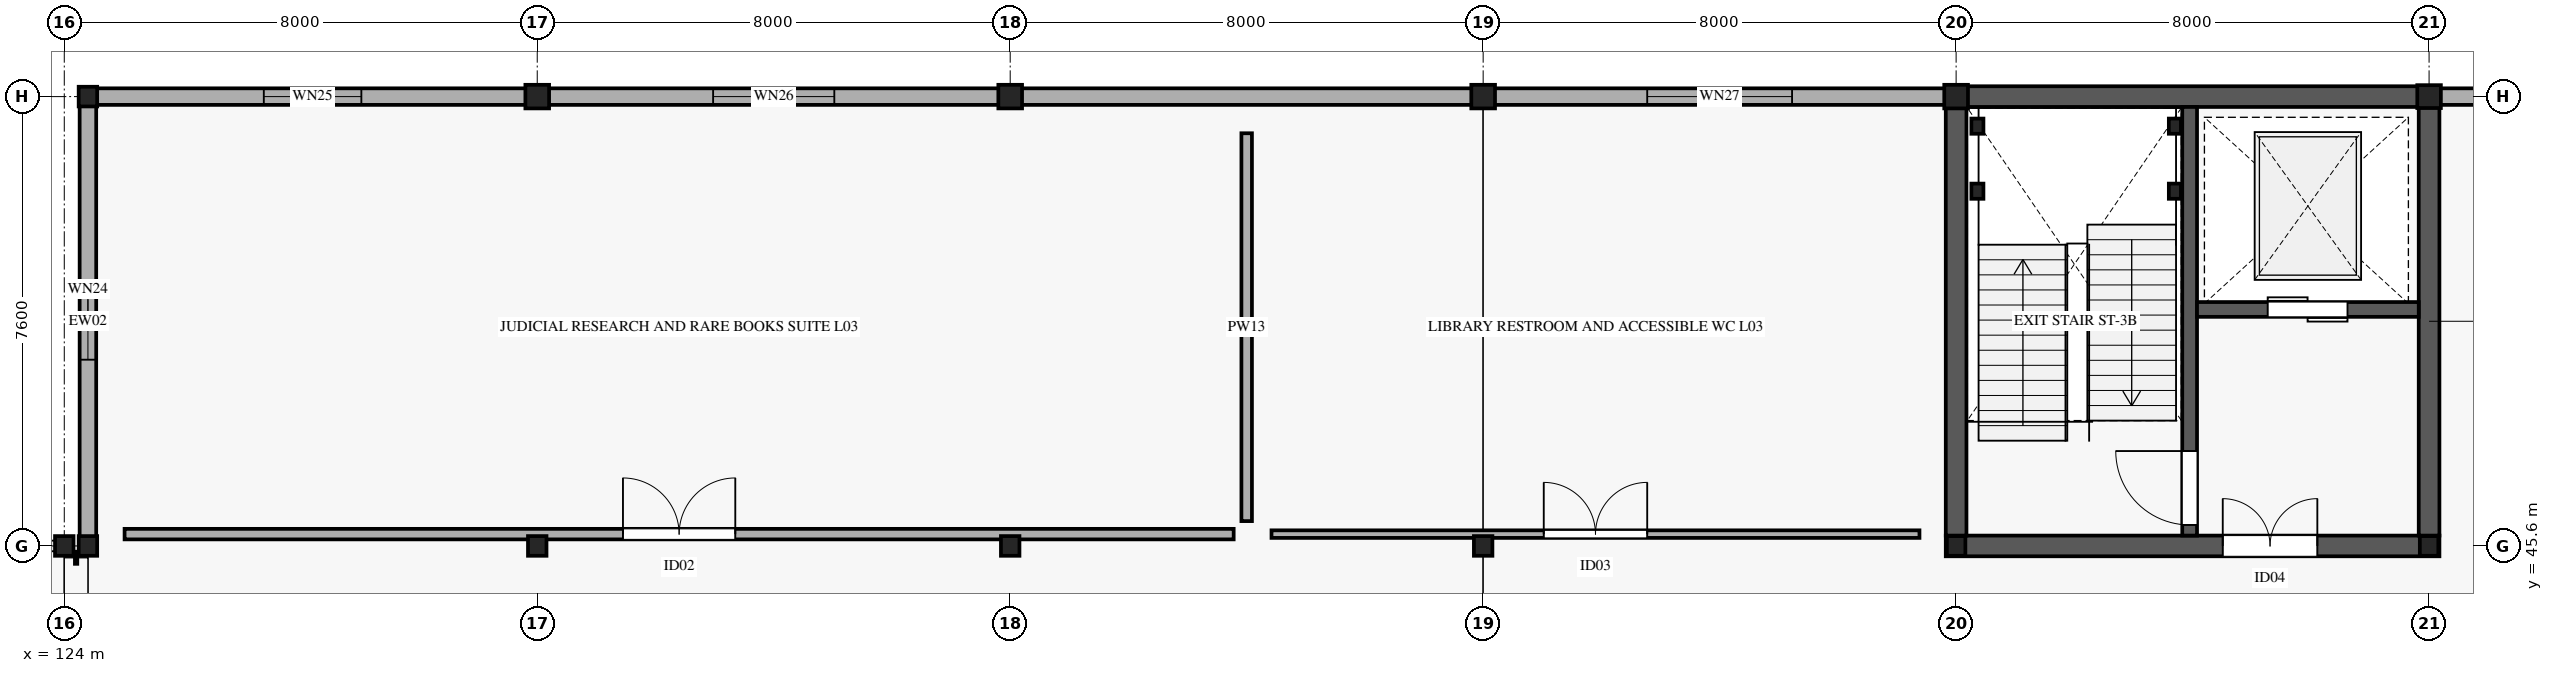
"""IFC4 building model, lengths in metres.
Left out: names, types, materials, properties, quantities, classifications, styles, units other than length and angle.
Written with IfcOpenShell. Run it as: python <this file> out.ifc"""

import sys

from ifc_helpers import new_model, si_unit, direction, frame, frame_2d, origin, origin_2d, place, context, subcontext, project, spatial, rectangle, i_section, extrude, element, fill, save


model = new_model("IFC4")
c1 = context("Model", 3, precision=1e-05, world=origin(), true_north=direction((0.0, 1.0)))
c2 = subcontext(c1, "Body", "Model", "MODEL_VIEW")
j1 = project(units=[si_unit("LENGTHUNIT", "METRE"), si_unit("PLANEANGLEUNIT", "RADIAN")], contexts=[c1])
p1 = place(None, origin())
s1 = spatial("IfcSite", under=j1, at=p1, CompositionType="ELEMENT")
p2 = place(p1, origin())
s2 = spatial("IfcBuilding", under=s1, at=p2, CompositionType="ELEMENT")
p3 = place(p2, frame((0.0, 0.0, 15.6)))
s3 = spatial("IfcBuildingStorey", under=s2, at=p3, CompositionType="ELEMENT", Elevation=15.6)
for number, where, z_axis, x_axis in (
    (1, (124.4, 45.6, 0.0), (0.0, 0.0, 1.0), (1.0, 0.0, 0.0)),
    (2, (124.4, 53.2, 0.0), (0.0, 0.0, 1.0), (1.0, 0.0, 0.0)),
    (3, (132.0, 45.6, 0.0), (0.0, 0.0, 1.0), (1.0, 0.0, 0.0)),
):
    element("IfcColumn", number, at=place(p3, frame(where, z_axis=z_axis, x_axis=x_axis)), inside=s3, PredefinedType="COLUMN", context=c2, shape_type="SweptSolid", body=[
        extrude(i_section(OverallWidth=0.313, OverallDepth=0.333, WebThickness=0.018, FlangeThickness=0.028, FilletRadius=0.015, at=origin_2d()), origin(), (0.0, 0.0, 1.0), 4.545),
    ])
p4 = place(p3, frame((132.0, 53.2, 0.0), z_axis=(0.0, 0.0, 1.0), x_axis=(1.0, 0.0, 0.0)))
e4 = element("IfcColumn", 4, at=p4, inside=s3, PredefinedType="COLUMN", context=c2, shape_type="SweptSolid", body=[
    extrude(i_section(OverallWidth=0.401, OverallDepth=0.399, WebThickness=0.025, FlangeThickness=0.04, FilletRadius=0.015, at=origin_2d()), origin(), (0.0, 0.0, 1.0), 4.545),
])
p5 = place(p3, frame((140.0, 45.6, 0.0), z_axis=(0.0, 0.0, 1.0), x_axis=(1.0, 0.0, 0.0)))
e5 = element("IfcColumn", 5, at=p5, inside=s3, PredefinedType="COLUMN", context=c2, shape_type="SweptSolid", body=[
    extrude(i_section(OverallWidth=0.313, OverallDepth=0.333, WebThickness=0.018, FlangeThickness=0.028, FilletRadius=0.015, at=origin_2d()), origin(), (0.0, 0.0, 1.0), 4.545),
])
p6 = place(p3, frame((140.0, 53.2, 0.0), z_axis=(0.0, 0.0, 1.0), x_axis=(1.0, 0.0, 0.0)))
e6 = element("IfcColumn", 6, at=p6, inside=s3, PredefinedType="COLUMN", context=c2, shape_type="SweptSolid", body=[
    extrude(i_section(OverallWidth=0.401, OverallDepth=0.399, WebThickness=0.025, FlangeThickness=0.04, FilletRadius=0.015, at=origin_2d()), origin(), (0.0, 0.0, 1.0), 4.545),
])
p7 = place(p3, frame((148.0, 45.6, 0.0), z_axis=(0.0, 0.0, 1.0), x_axis=(1.0, 0.0, 0.0)))
e7 = element("IfcColumn", 7, at=p7, inside=s3, PredefinedType="COLUMN", context=c2, shape_type="SweptSolid", body=[
    extrude(i_section(OverallWidth=0.313, OverallDepth=0.333, WebThickness=0.018, FlangeThickness=0.028, FilletRadius=0.015, at=origin_2d()), origin(), (0.0, 0.0, 1.0), 4.545),
])
p8 = place(p3, frame((148.0, 53.2, 0.0), z_axis=(0.0, 0.0, 1.0), x_axis=(1.0, 0.0, 0.0)))
e8 = element("IfcColumn", 8, at=p8, inside=s3, PredefinedType="COLUMN", context=c2, shape_type="SweptSolid", body=[
    extrude(i_section(OverallWidth=0.401, OverallDepth=0.399, WebThickness=0.025, FlangeThickness=0.04, FilletRadius=0.015, at=origin_2d()), origin(), (0.0, 0.0, 1.0), 4.545),
])
p9 = place(p3, frame((156.0, 45.6, 0.0), z_axis=(0.0, 0.0, 1.0), x_axis=(1.0, 0.0, 0.0)))
e9 = element("IfcColumn", 9, at=p9, inside=s3, PredefinedType="COLUMN", context=c2, shape_type="SweptSolid", body=[
    extrude(i_section(OverallWidth=0.313, OverallDepth=0.333, WebThickness=0.018, FlangeThickness=0.028, FilletRadius=0.015, at=origin_2d()), origin(), (0.0, 0.0, 1.0), 4.545),
])
p10 = place(p3, frame((156.0, 53.2, 0.0), z_axis=(0.0, 0.0, 1.0), x_axis=(1.0, 0.0, 0.0)))
e10 = element("IfcColumn", 10, at=p10, inside=s3, PredefinedType="COLUMN", context=c2, shape_type="SweptSolid", body=[
    extrude(i_section(OverallWidth=0.401, OverallDepth=0.399, WebThickness=0.025, FlangeThickness=0.04, FilletRadius=0.015, at=origin_2d()), origin(), (0.0, 0.0, 1.0), 4.545),
])
p11 = place(p3, frame((164.0, 45.6, 0.0), z_axis=(0.0, 0.0, 1.0), x_axis=(1.0, 0.0, 0.0)))
e11 = element("IfcColumn", 11, at=p11, inside=s3, PredefinedType="COLUMN", context=c2, shape_type="SweptSolid", body=[
    extrude(i_section(OverallWidth=0.313, OverallDepth=0.333, WebThickness=0.018, FlangeThickness=0.028, FilletRadius=0.015, at=origin_2d()), origin(), (0.0, 0.0, 1.0), 4.545),
])
p12 = place(p3, frame((164.0, 53.2, 0.0), z_axis=(0.0, 0.0, 1.0), x_axis=(1.0, 0.0, 0.0)))
e12 = element("IfcColumn", 12, at=p12, inside=s3, PredefinedType="COLUMN", context=c2, shape_type="SweptSolid", body=[
    extrude(i_section(OverallWidth=0.399, OverallDepth=0.387, WebThickness=0.021, FlangeThickness=0.033, FilletRadius=0.015, at=origin_2d()), origin(), (0.0, 0.0, 1.0), 4.545),
])
p13 = place(p3, frame((124.0, 45.6, 0.0), z_axis=(0.0, 0.0, 1.0), x_axis=(1.0, 0.0, 0.0)))
e13 = element("IfcColumn", 13, at=p13, inside=s3, PredefinedType="COLUMN", context=c2, shape_type="SweptSolid", body=[
    extrude(i_section(OverallWidth=0.313, OverallDepth=0.333, WebThickness=0.018, FlangeThickness=0.028, FilletRadius=0.015, at=origin_2d()), origin(), (0.0, 0.0, 1.0), 4.59),
])
p14 = place(p3, frame((124.4, 45.58, 0.0), z_axis=(0.0, 0.0, 1.0), x_axis=(0.0, 1.0, 0.0)))
e14 = element("IfcWall", 14, at=p14, inside=s3, PredefinedType="STANDARD", context=c2, shape_type="SweptSolid", body=[
    extrude(rectangle(XDim=7.64, YDim=0.28, at=frame_2d((3.82, 0.0))), origin(), (0.0, 0.0, 1.0), 3.605),
])
p15 = place(p14, frame((3.17, 0.0, 0.75)))
e15 = element("IfcOpeningElement", 15, at=p15, cuts=e14, PredefinedType="OPENING", context=c2, shape_type="SweptSolid", body=[
    extrude(rectangle(XDim=1.3, YDim=1.55, at=frame_2d((0.65, 0.775))), frame((0.0, 0.15, 0.0), z_axis=(0.0, -1.0, 0.0), x_axis=(1.0, 0.0, 0.0)), (0.0, 0.0, 1.0), 0.3),
])
p16 = place(p3, frame((124.38, 53.2, 0.0), z_axis=(0.0, 0.0, 1.0), x_axis=(1.0, 0.0, 0.0)))
e16 = element("IfcWall", 16, at=p16, inside=s3, PredefinedType="STANDARD", context=c2, shape_type="SweptSolid", body=[
    extrude(rectangle(XDim=7.64, YDim=0.28, at=frame_2d((3.82, 0.0))), origin(), (0.0, 0.0, 1.0), 3.605),
])
p17 = place(p16, frame((2.995, 0.0, 0.75)))
e17 = element("IfcOpeningElement", 17, at=p17, cuts=e16, PredefinedType="OPENING", context=c2, shape_type="SweptSolid", body=[
    extrude(rectangle(XDim=1.65, YDim=1.55, at=frame_2d((0.825, 0.775))), frame((0.0, 0.15, 0.0), z_axis=(0.0, -1.0, 0.0), x_axis=(1.0, 0.0, 0.0)), (0.0, 0.0, 1.0), 0.3),
])
p18 = place(p3, frame((131.98, 53.2, 0.0), z_axis=(0.0, 0.0, 1.0), x_axis=(1.0, 0.0, 0.0)))
e18 = element("IfcWall", 18, at=p18, inside=s3, PredefinedType="STANDARD", context=c2, shape_type="SweptSolid", body=[
    extrude(rectangle(XDim=8.04, YDim=0.28, at=frame_2d((4.02, 0.0))), origin(), (0.0, 0.0, 1.0), 3.605),
])
p19 = place(p18, frame((2.995, 0.0, 0.75)))
e19 = element("IfcOpeningElement", 19, at=p19, cuts=e18, PredefinedType="OPENING", context=c2, shape_type="SweptSolid", body=[
    extrude(rectangle(XDim=2.05, YDim=1.55, at=frame_2d((1.025, 0.775))), frame((0.0, 0.15, 0.0), z_axis=(0.0, -1.0, 0.0), x_axis=(1.0, 0.0, 0.0)), (0.0, 0.0, 1.0), 0.3),
])
p20 = place(p3, frame((139.98, 53.2, 0.0), z_axis=(0.0, 0.0, 1.0), x_axis=(1.0, 0.0, 0.0)))
e20 = element("IfcWall", 20, at=p20, inside=s3, PredefinedType="STANDARD", context=c2, shape_type="SweptSolid", body=[
    extrude(rectangle(XDim=8.04, YDim=0.28, at=frame_2d((4.02, 0.0))), origin(), (0.0, 0.0, 1.0), 3.605),
])
p21 = place(p3, frame((147.98, 53.2, 0.0), z_axis=(0.0, 0.0, 1.0), x_axis=(1.0, 0.0, 0.0)))
e21 = element("IfcWall", 21, at=p21, inside=s3, PredefinedType="STANDARD", context=c2, shape_type="SweptSolid", body=[
    extrude(rectangle(XDim=8.04, YDim=0.28, at=frame_2d((4.02, 0.0))), origin(), (0.0, 0.0, 1.0), 3.605),
])
p22 = place(p21, frame((2.795, 0.0, 0.75)))
e22 = element("IfcOpeningElement", 22, at=p22, cuts=e21, PredefinedType="OPENING", context=c2, shape_type="SweptSolid", body=[
    extrude(rectangle(XDim=2.45, YDim=1.55, at=frame_2d((1.225, 0.775))), frame((0.0, 0.15, 0.0), z_axis=(0.0, -1.0, 0.0), x_axis=(1.0, 0.0, 0.0)), (0.0, 0.0, 1.0), 0.3),
])
p23 = place(p3, frame((163.98, 53.2, 0.0), z_axis=(0.0, 0.0, 1.0), x_axis=(1.0, 0.0, 0.0)))
e23 = element("IfcWall", 23, at=p23, inside=s3, PredefinedType="STANDARD", context=c2, shape_type="SweptSolid", body=[
    extrude(rectangle(XDim=8.04, YDim=0.28, at=frame_2d((4.02, 0.0))), origin(), (0.0, 0.0, 1.0), 3.605),
])
p24 = place(p23, frame((2.595, 0.0, 0.75)))
e24 = element("IfcOpeningElement", 24, at=p24, cuts=e23, PredefinedType="OPENING", context=c2, shape_type="SweptSolid", body=[
    extrude(rectangle(XDim=2.85, YDim=1.55, at=frame_2d((1.425, 0.775))), frame((0.0, 0.15, 0.0), z_axis=(0.0, -1.0, 0.0), x_axis=(1.0, 0.0, 0.0)), (0.0, 0.0, 1.0), 0.3),
])
p25 = place(p3, frame((124.18, 45.4, 0.0), z_axis=(0.0, 0.0, 1.0), x_axis=(1.0, 0.0, 0.0)))
e25 = element("IfcWall", 25, at=p25, inside=s3, PredefinedType="STANDARD", context=c2, shape_type="SweptSolid", body=[
    extrude(rectangle(XDim=0.04, YDim=0.205, at=frame_2d((0.02, 0.0))), origin(), (0.0, 0.0, 1.0), 4.02),
])
p26 = place(p3, frame((155.825, 45.6, 0.0), z_axis=(0.0, 0.0, 1.0), x_axis=(1.0, 0.0, 0.0)))
e26 = element("IfcWall", 26, at=p26, inside=s3, PredefinedType="SHEAR", context=c2, shape_type="SweptSolid", body=[
    extrude(rectangle(XDim=8.35, YDim=0.35, at=frame_2d((4.175, 0.0))), origin(), (0.0, 0.0, 1.0), 4.545),
])
p27 = place(p26, frame((4.685, 0.0, 0.0)))
e27 = element("IfcOpeningElement", 27, at=p27, cuts=e26, PredefinedType="OPENING", context=c2, shape_type="SweptSolid", body=[
    extrude(rectangle(XDim=1.6, YDim=2.35, at=frame_2d((0.8, 1.175))), frame((0.0, 0.185, 0.0), z_axis=(0.0, -1.0, 0.0), x_axis=(1.0, 0.0, 0.0)), (0.0, 0.0, 1.0), 0.37),
])
p28 = place(p3, frame((155.825, 53.2, 0.0), z_axis=(0.0, 0.0, 1.0), x_axis=(1.0, 0.0, 0.0)))
e28 = element("IfcWall", 28, at=p28, inside=s3, PredefinedType="SHEAR", context=c2, shape_type="SweptSolid", body=[
    extrude(rectangle(XDim=8.35, YDim=0.35, at=frame_2d((4.175, 0.0))), origin(), (0.0, 0.0, 1.0), 4.545),
])
for number, where, z_axis, x_axis in (
    (29, (156.0, 45.775, 0.0), (0.0, 0.0, 1.0), (0.0, 1.0, 0.0)),
    (30, (164.0, 45.775, 0.0), (0.0, 0.0, 1.0), (0.0, 1.0, 0.0)),
):
    element("IfcWall", number, at=place(p3, frame(where, z_axis=z_axis, x_axis=x_axis)), inside=s3, PredefinedType="SHEAR", context=c2, shape_type="SweptSolid", body=[
        extrude(rectangle(XDim=7.25, YDim=0.35, at=frame_2d((3.625, 0.0))), origin(), (0.0, 0.0, 1.0), 4.545),
    ])
p29 = place(p3, frame((159.95, 45.775, 0.0), z_axis=(0.0, 0.0, 1.0), x_axis=(0.0, 1.0, 0.0)))
e31 = element("IfcWall", 31, at=p29, inside=s3, PredefinedType="SHEAR", context=c2, shape_type="SweptSolid", body=[
    extrude(rectangle(XDim=7.25, YDim=0.25, at=frame_2d((3.625, 0.0))), origin(), (0.0, 0.0, 1.0), 4.545),
])
p30 = place(p29, frame((0.18, 0.0, 0.0)))
e32 = element("IfcOpeningElement", 32, at=p30, cuts=e31, PredefinedType="OPENING", context=c2, shape_type="SweptSolid", body=[
    extrude(rectangle(XDim=1.25, YDim=2.2, at=frame_2d((0.625, 1.1))), frame((0.0, 0.135, 0.0), z_axis=(0.0, -1.0, 0.0), x_axis=(1.0, 0.0, 0.0)), (0.0, 0.0, 1.0), 0.27),
])
p31 = place(p3, frame((160.075, 49.6, 0.0), z_axis=(0.0, 0.0, 1.0), x_axis=(1.0, 0.0, 0.0)))
e33 = element("IfcWall", 33, at=p31, inside=s3, PredefinedType="SHEAR", context=c2, shape_type="SweptSolid", body=[
    extrude(rectangle(XDim=3.75, YDim=0.25, at=frame_2d((1.875, 0.0))), origin(), (0.0, 0.0, 1.0), 4.545),
])
p32 = place(p31, frame((1.195, 0.0, 0.0)))
e34 = element("IfcOpeningElement", 34, at=p32, cuts=e33, PredefinedType="OPENING", context=c2, shape_type="SweptSolid", body=[
    extrude(rectangle(XDim=1.35, YDim=2.2, at=frame_2d((0.675, 1.1))), frame((0.0, 0.135, 0.0), z_axis=(0.0, -1.0, 0.0), x_axis=(1.0, 0.0, 0.0)), (0.0, 0.0, 1.0), 0.27),
])
for number, where, z_axis, x_axis in (
    (35, (156.36, 51.6, 0.0), (0.0, 0.0, 1.0), (1.0, 0.0, 0.0)),
    (36, (159.7, 51.6, 0.0), (0.0, 0.0, 1.0), (1.0, 0.0, 0.0)),
    (37, (156.36, 52.7, 0.0), (0.0, 0.0, 1.0), (1.0, 0.0, 0.0)),
    (38, (159.7, 52.7, 0.0), (0.0, 0.0, 1.0), (1.0, 0.0, 0.0)),
):
    element("IfcColumn", number, at=place(p3, frame(where, z_axis=z_axis, x_axis=x_axis)), inside=s3, PredefinedType="COLUMN", context=c2, shape_type="SweptSolid", body=[
        extrude(i_section(OverallWidth=0.204, OverallDepth=0.257, WebThickness=0.009, FlangeThickness=0.016, FilletRadius=0.013, at=origin_2d()), origin(), (0.0, 0.0, 1.0), 4.795),
    ])
p33 = place(p3, frame((125.02, 45.8, 0.0), z_axis=(0.0, 0.0, 1.0), x_axis=(1.0, 0.0, 0.0)))
e39 = element("IfcWall", 39, at=p33, inside=s3, PredefinedType="PARTITIONING", context=c2, shape_type="SweptSolid", body=[
    extrude(rectangle(XDim=18.76, YDim=0.178, at=frame_2d((9.38, 0.0))), origin(), (0.0, 0.0, 1.0), 3.45),
])
p34 = place(p33, frame((8.43, 0.0, 0.0)))
e40 = element("IfcOpeningElement", 40, at=p34, cuts=e39, PredefinedType="OPENING", context=c2, shape_type="SweptSolid", body=[
    extrude(rectangle(XDim=1.9, YDim=2.4, at=frame_2d((0.95, 1.2))), frame((0.0, 0.099, 0.0), z_axis=(0.0, -1.0, 0.0), x_axis=(1.0, 0.0, 0.0)), (0.0, 0.0, 1.0), 0.198),
])
p35 = place(p3, frame((144.0, 46.02, 0.0), z_axis=(0.0, 0.0, 1.0), x_axis=(0.0, 1.0, 0.0)))
e41 = element("IfcWall", 41, at=p35, inside=s3, PredefinedType="PARTITIONING", context=c2, shape_type="SweptSolid", body=[
    extrude(rectangle(XDim=6.56, YDim=0.178, at=frame_2d((3.28, 0.0))), origin(), (0.0, 0.0, 1.0), 3.45),
])
p36 = place(p3, frame((144.42, 45.8, 0.0), z_axis=(0.0, 0.0, 1.0), x_axis=(1.0, 0.0, 0.0)))
e42 = element("IfcWall", 42, at=p36, inside=s3, PredefinedType="PARTITIONING", context=c2, shape_type="SweptSolid", body=[
    extrude(rectangle(XDim=10.96, YDim=0.128, at=frame_2d((5.48, 0.0))), origin(), (0.0, 0.0, 1.0), 3.45),
])
p37 = place(p36, frame((4.605, 0.0, 0.0)))
e43 = element("IfcOpeningElement", 43, at=p37, cuts=e42, PredefinedType="OPENING", context=c2, shape_type="SweptSolid", body=[
    extrude(rectangle(XDim=1.75, YDim=2.35, at=frame_2d((0.875, 1.175))), frame((0.0, 0.074, 0.0), z_axis=(0.0, -1.0, 0.0), x_axis=(1.0, 0.0, 0.0)), (0.0, 0.0, 1.0), 0.148),
])
p38 = place(p15, origin())
e44 = element("IfcWindow", 44, at=p38, inside=s3, PartitioningType="SINGLE_PANEL", PredefinedType="WINDOW", context=c2, shape_type="SweptSolid", body=[
    extrude(rectangle(XDim=1.3, YDim=1.55, at=frame_2d((0.65, 0.775))), frame((0.0, 0.03, 0.0), z_axis=(0.0, -1.0, 0.0), x_axis=(1.0, 0.0, 0.0)), (0.0, 0.0, 1.0), 0.06),
])
fill(e15, e44)
p39 = place(p17, origin())
e45 = element("IfcWindow", 45, at=p39, inside=s3, PartitioningType="SINGLE_PANEL", PredefinedType="WINDOW", context=c2, shape_type="SweptSolid", body=[
    extrude(rectangle(XDim=1.65, YDim=1.55, at=frame_2d((0.825, 0.775))), frame((0.0, 0.03, 0.0), z_axis=(0.0, -1.0, 0.0), x_axis=(1.0, 0.0, 0.0)), (0.0, 0.0, 1.0), 0.06),
])
fill(e17, e45)
p40 = place(p19, origin())
e46 = element("IfcWindow", 46, at=p40, inside=s3, PartitioningType="SINGLE_PANEL", PredefinedType="WINDOW", context=c2, shape_type="SweptSolid", body=[
    extrude(rectangle(XDim=2.05, YDim=1.55, at=frame_2d((1.025, 0.775))), frame((0.0, 0.03, 0.0), z_axis=(0.0, -1.0, 0.0), x_axis=(1.0, 0.0, 0.0)), (0.0, 0.0, 1.0), 0.06),
])
fill(e19, e46)
p41 = place(p22, origin())
e47 = element("IfcWindow", 47, at=p41, inside=s3, PartitioningType="SINGLE_PANEL", PredefinedType="WINDOW", context=c2, shape_type="SweptSolid", body=[
    extrude(rectangle(XDim=2.45, YDim=1.55, at=frame_2d((1.225, 0.775))), frame((0.0, 0.03, 0.0), z_axis=(0.0, -1.0, 0.0), x_axis=(1.0, 0.0, 0.0)), (0.0, 0.0, 1.0), 0.06),
])
fill(e22, e47)
p42 = place(p30, origin())
e48 = element("IfcDoor", 48, at=p42, inside=s3, OperationType="SINGLE_SWING_RIGHT", PredefinedType="DOOR", context=c2, shape_type="SweptSolid", body=[
    extrude(rectangle(XDim=1.25, YDim=2.2, at=frame_2d((0.625, 1.1))), frame((0.0, 0.025, 0.0), z_axis=(0.0, -1.0, 0.0), x_axis=(1.0, 0.0, 0.0)), (0.0, 0.0, 1.0), 0.05),
])
fill(e32, e48)
p43 = place(p27, origin())
e49 = element("IfcDoor", 49, at=p43, inside=s3, OperationType="DOUBLE_DOOR_SINGLE_SWING", PredefinedType="DOOR", context=c2, shape_type="SweptSolid", body=[
    extrude(rectangle(XDim=1.6, YDim=2.35, at=frame_2d((0.8, 1.175))), frame((0.0, 0.025, 0.0), z_axis=(0.0, -1.0, 0.0), x_axis=(1.0, 0.0, 0.0)), (0.0, 0.0, 1.0), 0.05),
])
fill(e27, e49)
p44 = place(p32, origin())
e50 = element("IfcDoor", 50, at=p44, inside=s3, OperationType="DOUBLE_DOOR_SLIDING", PredefinedType="DOOR", context=c2, shape_type="SweptSolid", body=[
    extrude(rectangle(XDim=1.35, YDim=2.2, at=frame_2d((0.675, 1.1))), frame((0.0, 0.025, 0.0), z_axis=(0.0, -1.0, 0.0), x_axis=(1.0, 0.0, 0.0)), (0.0, 0.0, 1.0), 0.05),
])
fill(e34, e50)
p45 = place(p34, origin())
e51 = element("IfcDoor", 51, at=p45, inside=s3, OperationType="DOUBLE_DOOR_SINGLE_SWING", PredefinedType="DOOR", context=c2, shape_type="SweptSolid", body=[
    extrude(rectangle(XDim=1.9, YDim=2.4, at=frame_2d((0.95, 1.2))), frame((0.0, 0.025, 0.0), z_axis=(0.0, -1.0, 0.0), x_axis=(1.0, 0.0, 0.0)), (0.0, 0.0, 1.0), 0.05),
])
fill(e40, e51)
p46 = place(p37, origin())
e52 = element("IfcDoor", 52, at=p46, inside=s3, OperationType="DOUBLE_DOOR_SINGLE_SWING", PredefinedType="DOOR", context=c2, shape_type="SweptSolid", body=[
    extrude(rectangle(XDim=1.75, YDim=2.35, at=frame_2d((0.875, 1.175))), frame((0.0, 0.025, 0.0), z_axis=(0.0, -1.0, 0.0), x_axis=(1.0, 0.0, 0.0)), (0.0, 0.0, 1.0), 0.05),
])
fill(e43, e52)
save(model, sys.argv[1])
